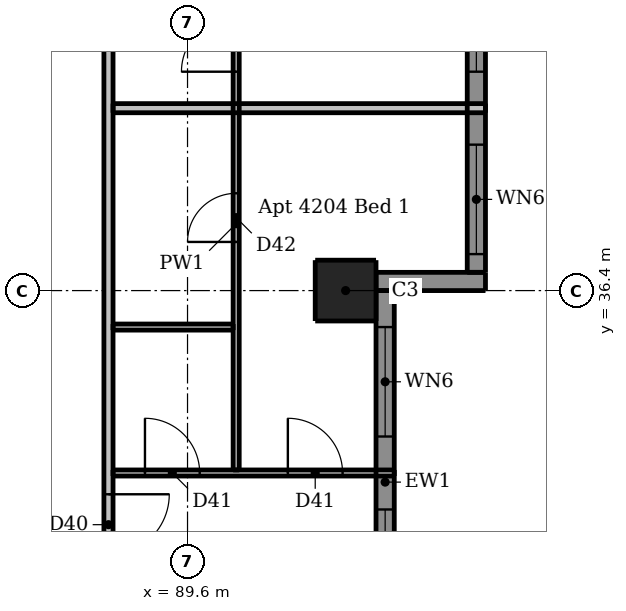
"""IFC4 building model, lengths in metres.
Left out: names, types, materials, properties, quantities, classifications, styles, units other than length and angle.
Written with IfcOpenShell. Run it as: python <this file> out.ifc"""

import sys

from ifc_helpers import new_model, si_unit, direction, frame, frame_2d, origin, origin_2d, place, context, subcontext, project, spatial, rectangle, extrude, element, fill, save


model = new_model("IFC4")
c1 = context("Model", 3, precision=1e-05, world=origin(), true_north=direction((0.0, 1.0)))
c2 = subcontext(c1, "Body", "Model", "MODEL_VIEW")
j1 = project(units=[si_unit("LENGTHUNIT", "METRE"), si_unit("PLANEANGLEUNIT", "RADIAN")], contexts=[c1])
p1 = place(None, origin())
s1 = spatial("IfcSite", under=j1, at=p1, CompositionType="ELEMENT")
p2 = place(p1, origin())
s2 = spatial("IfcBuilding", under=s1, at=p2, CompositionType="ELEMENT")
p3 = place(p2, frame((0.0, 0.0, 158.2)))
s3 = spatial("IfcBuildingStorey", under=s2, at=p3, CompositionType="ELEMENT", Elevation=158.2)
p4 = place(p3, frame((92.2, 36.4, 0.0), z_axis=(0.0, 0.0, 1.0), x_axis=(1.0, 0.0, 0.0)))
e1 = element("IfcColumn", 1, at=p4, inside=s3, PredefinedType="COLUMN", context=c2, shape_type="SweptSolid", body=[
    extrude(rectangle(XDim=1.0, YDim=1.0, at=origin_2d()), origin(), (0.0, 0.0, 1.0), 3.05),
])
p5 = place(p3, frame((92.7, 36.55, 0.0), z_axis=(0.0, 0.0, 1.0), x_axis=(1.0, 0.0, 0.0)))
e2 = element("IfcWall", 2, at=p5, inside=s3, PredefinedType="SOLIDWALL", context=c2, shape_type="SweptSolid", body=[
    extrude(rectangle(XDim=1.8, YDim=0.3, at=frame_2d((0.9, 0.0))), origin(), (0.0, 0.0, 1.0), 3.05),
])
p6 = place(p3, frame((92.85, 30.1, 0.0), z_axis=(0.0, 0.0, 1.0), x_axis=(0.0, 1.0, 0.0)))
e3 = element("IfcWall", 3, at=p6, inside=s3, PredefinedType="SOLIDWALL", context=c2, shape_type="SweptSolid", body=[
    extrude(rectangle(XDim=6.3, YDim=0.3, at=frame_2d((3.15, 0.0))), origin(), (0.0, 0.0, 1.0), 3.05),
])
p7 = place(p6, frame((0.9, 0.0, 0.15)))
e4 = element("IfcOpeningElement", 4, at=p7, cuts=e3, PredefinedType="OPENING", context=c2, shape_type="SweptSolid", body=[
    extrude(rectangle(XDim=1.8, YDim=2.1, at=frame_2d((0.9, 1.05))), frame((0.0, 0.16, 0.0), z_axis=(0.0, -1.0, 0.0), x_axis=(1.0, 0.0, 0.0)), (0.0, 0.0, 1.0), 0.32),
])
p8 = place(p6, frame((3.9, 0.0, 0.15)))
e5 = element("IfcOpeningElement", 5, at=p8, cuts=e3, PredefinedType="OPENING", context=c2, shape_type="SweptSolid", body=[
    extrude(rectangle(XDim=1.8, YDim=2.1, at=frame_2d((0.9, 1.05))), frame((0.0, 0.16, 0.0), z_axis=(0.0, -1.0, 0.0), x_axis=(1.0, 0.0, 0.0)), (0.0, 0.0, 1.0), 0.32),
])
p9 = place(p3, frame((94.35, 36.7, 0.0), z_axis=(0.0, 0.0, 1.0), x_axis=(0.0, 1.0, 0.0)))
e6 = element("IfcWall", 6, at=p9, inside=s3, PredefinedType="SOLIDWALL", context=c2, shape_type="SweptSolid", body=[
    extrude(rectangle(XDim=5.6, YDim=0.3, at=frame_2d((2.8, 0.0))), origin(), (0.0, 0.0, 1.0), 3.05),
])
p10 = place(p9, frame((0.3, 0.0, 0.15)))
e7 = element("IfcOpeningElement", 7, at=p10, cuts=e6, PredefinedType="OPENING", context=c2, shape_type="SweptSolid", body=[
    extrude(rectangle(XDim=1.8, YDim=2.1, at=frame_2d((0.9, 1.05))), frame((0.0, 0.16, 0.0), z_axis=(0.0, -1.0, 0.0), x_axis=(1.0, 0.0, 0.0)), (0.0, 0.0, 1.0), 0.32),
])
p11 = place(p9, frame((3.3, 0.0, 0.15)))
e8 = element("IfcOpeningElement", 8, at=p11, cuts=e6, PredefinedType="OPENING", context=c2, shape_type="SweptSolid", body=[
    extrude(rectangle(XDim=1.8, YDim=2.1, at=frame_2d((0.9, 1.05))), frame((0.0, 0.16, 0.0), z_axis=(0.0, -1.0, 0.0), x_axis=(1.0, 0.0, 0.0)), (0.0, 0.0, 1.0), 0.32),
])
p12 = place(p3, frame((90.4, 33.45, 0.0), z_axis=(0.0, 0.0, 1.0), x_axis=(0.0, 1.0, 0.0)))
e9 = element("IfcWall", 9, at=p12, inside=s3, PredefinedType="PARTITIONING", context=c2, shape_type="SweptSolid", body=[
    extrude(rectangle(XDim=8.1, YDim=0.1, at=frame_2d((4.05, 0.0))), origin(), (0.0, 0.0, 1.0), 3.05),
])
p13 = place(p12, frame((3.75, 0.0, 0.0)))
e10 = element("IfcOpeningElement", 10, at=p13, cuts=e9, PredefinedType="OPENING", context=c2, shape_type="SweptSolid", body=[
    extrude(rectangle(XDim=0.8, YDim=2.1, at=frame_2d((0.4, 1.05))), frame((0.0, 0.06, 0.0), z_axis=(0.0, -1.0, 0.0), x_axis=(1.0, 0.0, 0.0)), (0.0, 0.0, 1.0), 0.12),
])
p14 = place(p12, frame((6.55, 0.0, 0.0)))
e11 = element("IfcOpeningElement", 11, at=p14, cuts=e9, PredefinedType="OPENING", context=c2, shape_type="SweptSolid", body=[
    extrude(rectangle(XDim=0.9, YDim=2.1, at=frame_2d((0.45, 1.05))), frame((0.0, 0.06, 0.0), z_axis=(0.0, -1.0, 0.0), x_axis=(1.0, 0.0, 0.0)), (0.0, 0.0, 1.0), 0.12),
])
p15 = place(p3, frame((88.375, 35.8, 0.0), z_axis=(0.0, 0.0, 1.0), x_axis=(1.0, 0.0, 0.0)))
e12 = element("IfcWall", 12, at=p15, inside=s3, PredefinedType="PARTITIONING", context=c2, shape_type="SweptSolid", body=[
    extrude(rectangle(XDim=1.975, YDim=0.1, at=frame_2d((0.988, 0.0))), origin(), (0.0, 0.0, 1.0), 3.05),
])
p16 = place(p3, frame((88.375, 33.4, 0.0), z_axis=(0.0, 0.0, 1.0), x_axis=(1.0, 0.0, 0.0)))
e13 = element("IfcWall", 13, at=p16, inside=s3, PredefinedType="PARTITIONING", context=c2, shape_type="SweptSolid", body=[
    extrude(rectangle(XDim=4.625, YDim=0.1, at=frame_2d((2.312, 0.0))), origin(), (0.0, 0.0, 1.0), 3.05),
])
p17 = place(p16, frame((0.525, 0.0, 0.0)))
e14 = element("IfcOpeningElement", 14, at=p17, cuts=e13, PredefinedType="OPENING", context=c2, shape_type="SweptSolid", body=[
    extrude(rectangle(XDim=0.9, YDim=2.1, at=frame_2d((0.45, 1.05))), frame((0.0, 0.06, 0.0), z_axis=(0.0, -1.0, 0.0), x_axis=(1.0, 0.0, 0.0)), (0.0, 0.0, 1.0), 0.12),
])
p18 = place(p16, frame((2.875, 0.0, 0.0)))
e15 = element("IfcOpeningElement", 15, at=p18, cuts=e13, PredefinedType="OPENING", context=c2, shape_type="SweptSolid", body=[
    extrude(rectangle(XDim=0.9, YDim=2.1, at=frame_2d((0.45, 1.05))), frame((0.0, 0.06, 0.0), z_axis=(0.0, -1.0, 0.0), x_axis=(1.0, 0.0, 0.0)), (0.0, 0.0, 1.0), 0.12),
])
p19 = place(p3, frame((88.3, 61.175, 0.0), z_axis=(0.0, 0.0, 1.0), x_axis=(0.0, -1.0, 0.0)))
e16 = element("IfcWall", 16, at=p19, inside=s3, PredefinedType="PARTITIONING", context=c2, shape_type="SweptSolid", body=[
    extrude(rectangle(XDim=29.4, YDim=0.15, at=frame_2d((14.7, 0.0))), origin(), (0.0, 0.0, 1.0), 3.05),
])
p20 = place(p19, frame((28.125, 0.0, 0.0)))
e17 = element("IfcOpeningElement", 17, at=p20, cuts=e16, PredefinedType="OPENING", context=c2, shape_type="SweptSolid", body=[
    extrude(rectangle(XDim=1.0, YDim=2.1, at=frame_2d((0.5, 1.05))), frame((0.0, 0.085, 0.0), z_axis=(0.0, -1.0, 0.0), x_axis=(1.0, 0.0, 0.0)), (0.0, 0.0, 1.0), 0.17),
])
p21 = place(p19, frame((18.275, 0.0, 0.0)))
e18 = element("IfcOpeningElement", 18, at=p21, cuts=e16, PredefinedType="OPENING", context=c2, shape_type="SweptSolid", body=[
    extrude(rectangle(XDim=1.0, YDim=2.1, at=frame_2d((0.5, 1.05))), frame((0.0, 0.085, 0.0), z_axis=(0.0, -1.0, 0.0), x_axis=(1.0, 0.0, 0.0)), (0.0, 0.0, 1.0), 0.17),
])
p22 = place(p19, frame((10.475, 0.0, 0.0)))
e19 = element("IfcOpeningElement", 19, at=p22, cuts=e16, PredefinedType="OPENING", context=c2, shape_type="SweptSolid", body=[
    extrude(rectangle(XDim=1.0, YDim=2.1, at=frame_2d((0.5, 1.05))), frame((0.0, 0.085, 0.0), z_axis=(0.0, -1.0, 0.0), x_axis=(1.0, 0.0, 0.0)), (0.0, 0.0, 1.0), 0.17),
])
p23 = place(p19, frame((3.275, 0.0, 0.0)))
e20 = element("IfcOpeningElement", 20, at=p23, cuts=e16, PredefinedType="OPENING", context=c2, shape_type="SweptSolid", body=[
    extrude(rectangle(XDim=1.0, YDim=2.1, at=frame_2d((0.5, 1.05))), frame((0.0, 0.085, 0.0), z_axis=(0.0, -1.0, 0.0), x_axis=(1.0, 0.0, 0.0)), (0.0, 0.0, 1.0), 0.17),
])
p24 = place(p3, frame((88.375, 39.4, 0.0), z_axis=(0.0, 0.0, 1.0), x_axis=(1.0, 0.0, 0.0)))
e21 = element("IfcWall", 21, at=p24, inside=s3, PredefinedType="PARTITIONING", context=c2, shape_type="SweptSolid", body=[
    extrude(rectangle(XDim=6.125, YDim=0.15, at=frame_2d((3.062, 0.0))), origin(), (0.0, 0.0, 1.0), 3.05),
])
p25 = place(p7, origin())
e22 = element("IfcWindow", 22, at=p25, inside=s3, PartitioningType="DOUBLE_PANEL_VERTICAL", PredefinedType="WINDOW", context=c2, shape_type="SweptSolid", body=[
    extrude(rectangle(XDim=1.8, YDim=2.1, at=frame_2d((0.9, 1.05))), frame((0.0, 0.03, 0.0), z_axis=(0.0, -1.0, 0.0), x_axis=(1.0, 0.0, 0.0)), (0.0, 0.0, 1.0), 0.06),
])
fill(e4, e22)
p26 = place(p8, origin())
e23 = element("IfcWindow", 23, at=p26, inside=s3, PartitioningType="DOUBLE_PANEL_VERTICAL", PredefinedType="WINDOW", context=c2, shape_type="SweptSolid", body=[
    extrude(rectangle(XDim=1.8, YDim=2.1, at=frame_2d((0.9, 1.05))), frame((0.0, 0.03, 0.0), z_axis=(0.0, -1.0, 0.0), x_axis=(1.0, 0.0, 0.0)), (0.0, 0.0, 1.0), 0.06),
])
fill(e5, e23)
p27 = place(p10, origin())
e24 = element("IfcWindow", 24, at=p27, inside=s3, PartitioningType="DOUBLE_PANEL_VERTICAL", PredefinedType="WINDOW", context=c2, shape_type="SweptSolid", body=[
    extrude(rectangle(XDim=1.8, YDim=2.1, at=frame_2d((0.9, 1.05))), frame((0.0, 0.03, 0.0), z_axis=(0.0, -1.0, 0.0), x_axis=(1.0, 0.0, 0.0)), (0.0, 0.0, 1.0), 0.06),
])
fill(e7, e24)
p28 = place(p11, origin())
e25 = element("IfcWindow", 25, at=p28, inside=s3, PartitioningType="DOUBLE_PANEL_VERTICAL", PredefinedType="WINDOW", context=c2, shape_type="SweptSolid", body=[
    extrude(rectangle(XDim=1.8, YDim=2.1, at=frame_2d((0.9, 1.05))), frame((0.0, 0.03, 0.0), z_axis=(0.0, -1.0, 0.0), x_axis=(1.0, 0.0, 0.0)), (0.0, 0.0, 1.0), 0.06),
])
fill(e8, e25)
p29 = place(p20, origin())
e26 = element("IfcDoor", 26, at=p29, inside=s3, OperationType="SINGLE_SWING_LEFT", PredefinedType="DOOR", context=c2, shape_type="SweptSolid", body=[
    extrude(rectangle(XDim=1.0, YDim=2.1, at=frame_2d((0.5, 1.05))), frame((0.0, 0.025, 0.0), z_axis=(0.0, -1.0, 0.0), x_axis=(1.0, 0.0, 0.0)), (0.0, 0.0, 1.0), 0.05),
])
fill(e17, e26)
p30 = place(p17, origin())
e27 = element("IfcDoor", 27, at=p30, inside=s3, OperationType="SINGLE_SWING_LEFT", PredefinedType="DOOR", context=c2, shape_type="SweptSolid", body=[
    extrude(rectangle(XDim=0.9, YDim=2.1, at=frame_2d((0.45, 1.05))), frame((0.0, 0.025, 0.0), z_axis=(0.0, -1.0, 0.0), x_axis=(1.0, 0.0, 0.0)), (0.0, 0.0, 1.0), 0.05),
])
fill(e14, e27)
p31 = place(p18, origin())
e28 = element("IfcDoor", 28, at=p31, inside=s3, OperationType="SINGLE_SWING_LEFT", PredefinedType="DOOR", context=c2, shape_type="SweptSolid", body=[
    extrude(rectangle(XDim=0.9, YDim=2.1, at=frame_2d((0.45, 1.05))), frame((0.0, 0.025, 0.0), z_axis=(0.0, -1.0, 0.0), x_axis=(1.0, 0.0, 0.0)), (0.0, 0.0, 1.0), 0.05),
])
fill(e15, e28)
p32 = place(p13, origin())
e29 = element("IfcDoor", 29, at=p32, inside=s3, OperationType="SINGLE_SWING_LEFT", PredefinedType="DOOR", context=c2, shape_type="SweptSolid", body=[
    extrude(rectangle(XDim=0.8, YDim=2.1, at=frame_2d((0.4, 1.05))), frame((0.0, 0.025, 0.0), z_axis=(0.0, -1.0, 0.0), x_axis=(1.0, 0.0, 0.0)), (0.0, 0.0, 1.0), 0.05),
])
fill(e10, e29)
p33 = place(p14, origin())
e30 = element("IfcDoor", 30, at=p33, inside=s3, OperationType="SINGLE_SWING_LEFT", PredefinedType="DOOR", context=c2, shape_type="SweptSolid", body=[
    extrude(rectangle(XDim=0.9, YDim=2.1, at=frame_2d((0.45, 1.05))), frame((0.0, 0.025, 0.0), z_axis=(0.0, -1.0, 0.0), x_axis=(1.0, 0.0, 0.0)), (0.0, 0.0, 1.0), 0.05),
])
fill(e11, e30)
save(model, sys.argv[1])
